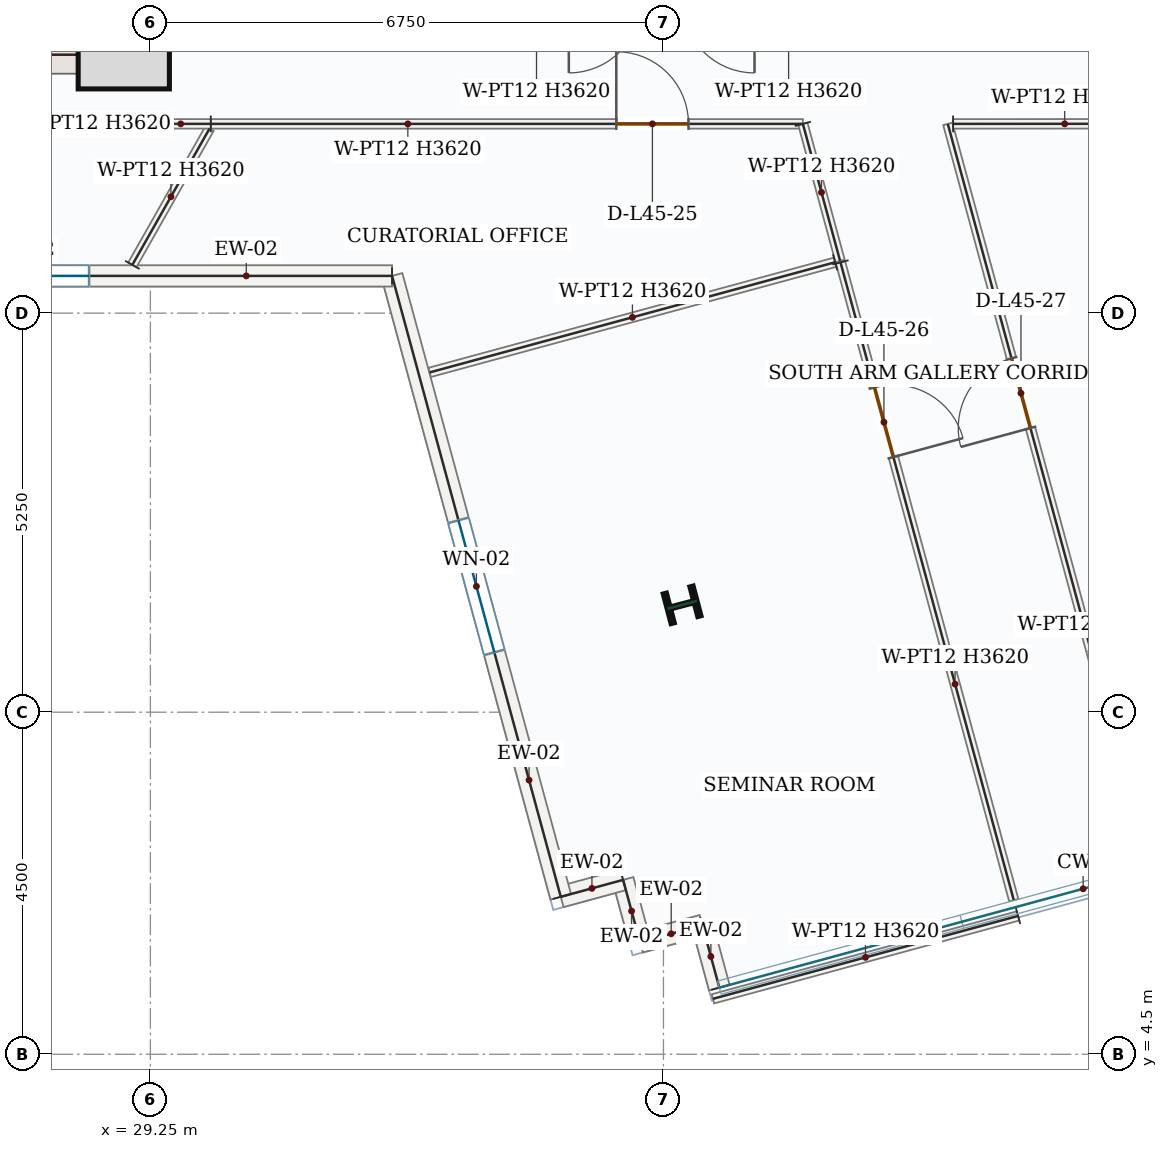
"""IFC4 building model, lengths in metres.
Left out: names, types, materials, properties, quantities, classifications, styles, units other than length and angle.
Written with IfcOpenShell. Run it as: python <this file> out.ifc"""

import sys

from ifc_helpers import new_model, si_unit, direction, frame, frame_2d, origin, origin_2d, place, context, subcontext, project, spatial, rectangle, i_section, extrude, source, transform, mapped, element, fill, save


model = new_model("IFC4")
c1 = context("Model", 3, precision=1e-05, world=origin(), true_north=direction((0.0, 1.0)))
c2 = subcontext(c1, "Body", "Model", "MODEL_VIEW")
j1 = project(units=[si_unit("LENGTHUNIT", "METRE"), si_unit("PLANEANGLEUNIT", "RADIAN")], contexts=[c1])
p1 = place(None, origin())
s1 = spatial("IfcSite", under=j1, at=p1, CompositionType="ELEMENT")
p2 = place(p1, origin())
s2 = spatial("IfcBuilding", under=s1, at=p2, CompositionType="ELEMENT")
p3 = place(p2, frame((0.0, 0.0, 194.1)))
s3 = spatial("IfcBuildingStorey", under=s2, at=p3, CompositionType="ELEMENT", Elevation=194.1)
p4 = place(p3, frame((29.0, 17.4, 0.0), z_axis=(0.0, 0.0, 1.0), x_axis=(0.0, 1.0, 0.0)))
e1 = element("IfcWall", 1, at=p4, inside=s3, PredefinedType="SHEAR", context=c2, shape_type="SweptSolid", body=[
    extrude(rectangle(XDim=8.55, YDim=0.5, at=frame_2d((4.275, 0.0))), origin(), (0.0, 0.0, 1.0), 3.62),
])
p5 = place(p4, frame((6.65, 0.0, 0.0)))
e2 = element("IfcOpeningElement", 2, at=p5, cuts=e1, PredefinedType="OPENING", context=c2, shape_type="SweptSolid", body=[
    extrude(rectangle(XDim=1.1, YDim=2.2, at=frame_2d((0.55, 1.1))), frame((0.0, 0.26, 0.0), z_axis=(0.0, -1.0, 0.0), x_axis=(1.0, 0.0, 0.0)), (0.0, 0.0, 1.0), 0.52),
])
p6 = place(p4, frame((2.15, 0.0, 0.0)))
e3 = element("IfcOpeningElement", 3, at=p6, cuts=e1, PredefinedType="OPENING", context=c2, shape_type="SweptSolid", body=[
    extrude(rectangle(XDim=0.88, YDim=2.1, at=frame_2d((0.44, 1.05))), frame((0.0, 0.26, 0.0), z_axis=(0.0, -1.0, 0.0), x_axis=(1.0, 0.0, 0.0)), (0.0, 0.0, 1.0), 0.52),
])
p7 = place(p4, frame((4.25, 0.0, 0.0)))
e4 = element("IfcOpeningElement", 4, at=p7, cuts=e1, PredefinedType="OPENING", context=c2, shape_type="SweptSolid", body=[
    extrude(rectangle(XDim=0.88, YDim=2.1, at=frame_2d((0.44, 1.05))), frame((0.0, 0.26, 0.0), z_axis=(0.0, -1.0, 0.0), x_axis=(1.0, 0.0, 0.0)), (0.0, 0.0, 1.0), 0.52),
])
m1 = source(origin(), c2, "Body", "SweptSolid", [
    extrude(rectangle(XDim=7.0, YDim=0.5, at=frame_2d((3.5, 0.0))), origin(), (0.0, 0.0, 1.0), 3.62),
])
p8 = place(p3, frame((21.75, 17.65, 0.0), z_axis=(0.0, 0.0, 1.0), x_axis=(1.0, 0.0, 0.0)))
e5 = element("IfcWall", 5, at=p8, inside=s3, PredefinedType="SHEAR", context=c2, shape_type="MappedRepresentation", body=[
    mapped(m1, transform((0.0, 0.0, 0.0), x_axis=(1.0, 0.0, 0.0), y_axis=(0.0, 1.0, 0.0), z_axis=(0.0, 0.0, 1.0), scale=1.0)),
])
m2 = source(origin(), c2, "Body", "SweptSolid", [
    extrude(rectangle(XDim=1.2, YDim=1.2, at=origin_2d()), origin(), (0.0, 0.0, 1.0), 3.9),
])
p9 = place(p3, frame((28.9, 17.8, 0.0), z_axis=(0.0, 0.0, 1.0), x_axis=(1.0, 0.0, 0.0)))
e6 = element("IfcColumn", 6, at=p9, inside=s3, PredefinedType="COLUMN", context=c2, shape_type="MappedRepresentation", body=[
    mapped(m2, transform((0.0, 0.0, 0.0), x_axis=(1.0, 0.0, 0.0), y_axis=(0.0, 1.0, 0.0), z_axis=(0.0, 0.0, 1.0), scale=1.0)),
])
m3 = source(origin(), c2, "Body", "SweptSolid", [
    extrude(i_section(OverallWidth=0.404, OverallDepth=0.407, WebThickness=0.027, FlangeThickness=0.044, FilletRadius=0.018, at=origin_2d()), origin(), (0.0, 0.0, 1.0), 3.9),
])
p10 = place(p3, frame((36.245, 10.412, 0.0), z_axis=(0.0, 0.0, 1.0), x_axis=(-0.255445757936, 0.966823388604, 0.0)))
e7 = element("IfcColumn", 7, at=p10, inside=s3, PredefinedType="COLUMN", context=c2, shape_type="MappedRepresentation", body=[
    mapped(m3, transform((0.0, 0.0, 0.0), x_axis=(1.0, 0.0, 0.0), y_axis=(0.0, 1.0, 0.0), z_axis=(0.0, 0.0, 1.0), scale=1.0)),
])
m4 = source(origin(), c2, "Body", "SweptSolid", [
    extrude(rectangle(XDim=0.85, YDim=0.28, at=frame_2d((0.425, 0.0))), origin(), (0.0, 0.0, 1.0), 3.62),
])
for number, where, z_axis, x_axis in (
    (8, (36.735, 5.376, 0.0), (0.0, 0.0, 1.0), (-0.262, 0.965, 0.0)),
    (9, (36.512, 6.197, 0.0), (0.0, 0.0, 1.0), (-0.965, -0.262, 0.0)),
    (10, (35.692, 5.974, 0.0), (0.0, 0.0, 1.0), (-0.262, 0.965, 0.0)),
    (11, (35.469, 6.794, 0.0), (0.0, 0.0, 1.0), (-0.965, -0.262, 0.0)),
):
    element("IfcWall", number, at=place(p3, frame(where, z_axis=z_axis, x_axis=x_axis)), inside=s3, PredefinedType="SOLIDWALL", context=c2, shape_type="MappedRepresentation", body=[
        mapped(m4, transform((0.0, 0.0, 0.0), x_axis=(1.0, 0.0, 0.0), y_axis=(0.0, 1.0, 0.0), z_axis=(0.0, 0.0, 1.0), scale=1.0)),
    ])
p11 = place(p3, frame((34.649, 6.571, 0.0), z_axis=(0.0, 0.0, 1.0), x_axis=(-0.262192380254, 0.965015624608, 0.0)))
e12 = element("IfcWall", 12, at=p11, inside=s3, PredefinedType="SOLIDWALL", context=c2, shape_type="SweptSolid", body=[
    extrude(rectangle(XDim=8.465, YDim=0.28, at=frame_2d((4.232, 0.0))), origin(), (0.0, 0.0, 1.0), 3.62),
])
p12 = place(p11, frame((3.333, 0.0, 0.85)))
e13 = element("IfcOpeningElement", 13, at=p12, cuts=e12, PredefinedType="OPENING", context=c2, shape_type="SweptSolid", body=[
    extrude(rectangle(XDim=1.8, YDim=1.75, at=frame_2d((0.9, 0.875))), frame((0.0, 0.15, 0.0), z_axis=(0.0, -1.0, 0.0), x_axis=(1.0, 0.0, 0.0)), (0.0, 0.0, 1.0), 0.3),
])
p13 = place(p3, frame((32.429, 14.74, 0.0), z_axis=(0.0, 0.0, 1.0), x_axis=(-1.0, 0.0, 0.0)))
e14 = element("IfcWall", 14, at=p13, inside=s3, PredefinedType="SOLIDWALL", context=c2, shape_type="SweptSolid", body=[
    extrude(rectangle(XDim=9.771, YDim=0.28, at=frame_2d((4.886, 0.0))), origin(), (0.0, 0.0, 1.0), 3.62),
])
p14 = place(p13, frame((3.986, 0.0, 0.85)))
e15 = element("IfcOpeningElement", 15, at=p14, cuts=e14, PredefinedType="OPENING", context=c2, shape_type="SweptSolid", body=[
    extrude(rectangle(XDim=1.8, YDim=1.75, at=frame_2d((0.9, 0.875))), frame((0.0, 0.15, 0.0), z_axis=(0.0, -1.0, 0.0), x_axis=(1.0, 0.0, 0.0)), (0.0, 0.0, 1.0), 0.3),
])
p15 = place(p3, frame((30.045, 16.74, 0.0), z_axis=(0.0, 0.0, 1.0), x_axis=(1.0, 0.0, 0.0)))
e16 = element("IfcWall", 16, at=p15, inside=s3, PredefinedType="PARTITIONING", context=c2, shape_type="SweptSolid", body=[
    extrude(rectangle(XDim=7.79, YDim=0.125, at=frame_2d((3.895, 0.0))), origin(), (0.0, 0.0, 1.0), 3.62),
])
p16 = place(p15, frame((5.335, 0.0, 0.0)))
e17 = element("IfcOpeningElement", 17, at=p16, cuts=e16, PredefinedType="OPENING", context=c2, shape_type="SweptSolid", body=[
    extrude(rectangle(XDim=0.95, YDim=2.15, at=frame_2d((0.475, 1.075))), frame((0.0, 0.073, 0.0), z_axis=(0.0, -1.0, 0.0), x_axis=(1.0, 0.0, 0.0)), (0.0, 0.0, 1.0), 0.145),
])
m5 = source(origin(), c2, "Body", "SweptSolid", [
    extrude(rectangle(XDim=1.868, YDim=0.125, at=frame_2d((0.934, 0.0))), origin(), (0.0, 0.0, 1.0), 3.62),
])
p17 = place(p3, frame((37.834, 16.74, 0.0), z_axis=(0.0, 0.0, 1.0), x_axis=(0.262166249224, -0.965022723964, 0.0)))
e18 = element("IfcWall", 18, at=p17, inside=s3, PredefinedType="PARTITIONING", context=c2, shape_type="MappedRepresentation", body=[
    mapped(m5, transform((0.0, 0.0, 0.0), x_axis=(1.0, 0.0, 0.0), y_axis=(0.0, 1.0, 0.0), z_axis=(0.0, 0.0, 1.0), scale=1.0)),
])
m6 = source(origin(), c2, "Body", "SweptSolid", [
    extrude(rectangle(XDim=5.527, YDim=0.125, at=frame_2d((2.764, 0.0))), origin(), (0.0, 0.0, 1.0), 3.62),
])
p18 = place(p3, frame((38.259, 14.92, 0.0), z_axis=(0.0, 0.0, 1.0), x_axis=(-0.965004985248, -0.262231535949, 0.0)))
e19 = element("IfcWall", 19, at=p18, inside=s3, PredefinedType="PARTITIONING", context=c2, shape_type="MappedRepresentation", body=[
    mapped(m6, transform((0.0, 0.0, 0.0), x_axis=(1.0, 0.0, 0.0), y_axis=(0.0, 1.0, 0.0), z_axis=(0.0, 0.0, 1.0), scale=1.0)),
])
m7 = source(origin(), c2, "Body", "SweptSolid", [
    extrude(rectangle(XDim=2.061, YDim=0.125, at=frame_2d((1.03, 0.0))), origin(), (0.0, 0.0, 1.0), 3.62),
])
p19 = place(p3, frame((29.013, 14.885, 0.0), z_axis=(0.0, 0.0, 1.0), x_axis=(0.492818271576, 0.870132260752, 0.0)))
e20 = element("IfcWall", 20, at=p19, inside=s3, PredefinedType="PARTITIONING", context=c2, shape_type="MappedRepresentation", body=[
    mapped(m7, transform((0.0, 0.0, 0.0), x_axis=(1.0, 0.0, 0.0), y_axis=(0.0, 1.0, 0.0), z_axis=(0.0, 0.0, 1.0), scale=1.0)),
])
p20 = place(p3, frame((38.329, 14.918, 0.0), z_axis=(0.0, 0.0, 1.0), x_axis=(0.262166936223, -0.965022537328, 0.0)))
e21 = element("IfcWall", 21, at=p20, inside=s3, PredefinedType="PARTITIONING", context=c2, shape_type="SweptSolid", body=[
    extrude(rectangle(XDim=8.695, YDim=0.125, at=frame_2d((4.348, 0.0))), origin(), (0.0, 0.0, 1.0), 3.62),
])
p21 = place(p20, frame((1.704, 0.0, 0.0)))
e22 = element("IfcOpeningElement", 22, at=p21, cuts=e21, PredefinedType="OPENING", context=c2, shape_type="SweptSolid", body=[
    extrude(rectangle(XDim=0.95, YDim=2.15, at=frame_2d((0.475, 1.075))), frame((0.0, 0.073, 0.0), z_axis=(0.0, -1.0, 0.0), x_axis=(1.0, 0.0, 0.0)), (0.0, 0.0, 1.0), 0.145),
])
m8 = source(origin(), c2, "Body", "SweptSolid", [
    extrude(rectangle(XDim=4.16, YDim=0.125, at=frame_2d((2.08, 0.0))), origin(), (0.0, 0.0, 1.0), 3.62),
])
p22 = place(p3, frame((40.665, 6.32, 0.0), z_axis=(0.0, 0.0, 1.0), x_axis=(-0.965023387541, -0.262163806614, 0.0)))
e23 = element("IfcWall", 23, at=p22, inside=s3, PredefinedType="PARTITIONING", context=c2, shape_type="MappedRepresentation", body=[
    mapped(m8, transform((0.0, 0.0, 0.0), x_axis=(1.0, 0.0, 0.0), y_axis=(0.0, 1.0, 0.0), z_axis=(0.0, 0.0, 1.0), scale=1.0)),
])
p23 = place(p3, frame((42.385, 7.01, 0.0), z_axis=(0.0, 0.0, 1.0), x_axis=(-0.262203523108, 0.965012597052, 0.0)))
e24 = element("IfcWall", 24, at=p23, inside=s3, PredefinedType="PARTITIONING", context=c2, shape_type="SweptSolid", body=[
    extrude(rectangle(XDim=10.083, YDim=0.125, at=frame_2d((5.042, 0.0))), origin(), (0.0, 0.0, 1.0), 3.62),
])
p24 = place(p23, frame((5.937, 0.0, 0.0)))
e25 = element("IfcOpeningElement", 25, at=p24, cuts=e24, PredefinedType="OPENING", context=c2, shape_type="SweptSolid", body=[
    extrude(rectangle(XDim=0.95, YDim=2.15, at=frame_2d((0.475, 1.075))), frame((0.0, 0.073, 0.0), z_axis=(0.0, -1.0, 0.0), x_axis=(1.0, 0.0, 0.0)), (0.0, 0.0, 1.0), 0.145),
])
m9 = source(origin(), c2, "Body", "SweptSolid", [
    extrude(rectangle(XDim=2.936, YDim=0.125, at=frame_2d((1.468, 0.0))), origin(), (0.0, 0.0, 1.0), 3.149),
])
p25 = place(p3, frame((39.811, 16.74, 0.0), z_axis=(0.0, 0.0, 1.0), x_axis=(0.999999913555, 0.00041580038, 0.0)))
e26 = element("IfcWall", 26, at=p25, inside=s3, PredefinedType="PARTITIONING", context=c2, shape_type="MappedRepresentation", body=[
    mapped(m9, transform((0.0, 0.0, 0.0), x_axis=(1.0, 0.0, 0.0), y_axis=(0.0, 1.0, 0.0), z_axis=(0.0, 0.0, 1.0), scale=1.0)),
])
m10 = source(origin(), c2, "Body", "SweptSolid", [
    extrude(rectangle(XDim=0.791, YDim=0.125, at=frame_2d((0.396, 0.0))), origin(), (0.0, 0.0, 1.0), 3.62),
])
p26 = place(p3, frame((29.253, 16.74, 0.0), z_axis=(0.0, 0.0, 1.0), x_axis=(0.999999809598, -0.000617093372, 0.0)))
e27 = element("IfcWall", 27, at=p26, inside=s3, PredefinedType="PARTITIONING", context=c2, shape_type="MappedRepresentation", body=[
    mapped(m10, transform((0.0, 0.0, 0.0), x_axis=(1.0, 0.0, 0.0), y_axis=(0.0, 1.0, 0.0), z_axis=(0.0, 0.0, 1.0), scale=1.0)),
])
m11 = source(origin(), c2, "Body", "SweptSolid", [
    extrude(rectangle(XDim=1.8, YDim=1.75, at=frame_2d((0.9, 0.875))), frame((0.0, 0.03, 0.0), z_axis=(0.0, -1.0, 0.0), x_axis=(1.0, 0.0, 0.0)), (0.0, 0.0, 1.0), 0.06),
])
p27 = place(p12, origin())
e28 = element("IfcWindow", 28, at=p27, inside=s3, PartitioningType="DOUBLE_PANEL_VERTICAL", PredefinedType="WINDOW", context=c2, shape_type="MappedRepresentation", body=[
    mapped(m11, transform((0.0, 0.0, 0.0), x_axis=(1.0, 0.0, 0.0), y_axis=(0.0, 1.0, 0.0), z_axis=(0.0, 0.0, 1.0), scale=1.0)),
])
fill(e13, e28)
p28 = place(p14, origin())
e29 = element("IfcWindow", 29, at=p28, inside=s3, PartitioningType="DOUBLE_PANEL_VERTICAL", PredefinedType="WINDOW", context=c2, shape_type="MappedRepresentation", body=[
    mapped(m11, transform((0.0, 0.0, 0.0), x_axis=(1.0, 0.0, 0.0), y_axis=(0.0, 1.0, 0.0), z_axis=(0.0, 0.0, 1.0), scale=1.0)),
])
fill(e15, e29)
m12 = source(origin(), c2, "Body", "SweptSolid", [
    extrude(rectangle(XDim=0.95, YDim=2.15, at=frame_2d((0.475, 1.075))), frame((0.0, 0.025, 0.0), z_axis=(0.0, -1.0, 0.0), x_axis=(1.0, 0.0, 0.0)), (0.0, 0.0, 1.0), 0.05),
])
p29 = place(p16, origin())
e30 = element("IfcDoor", 30, at=p29, inside=s3, OperationType="SINGLE_SWING_LEFT", PredefinedType="DOOR", context=c2, shape_type="MappedRepresentation", body=[
    mapped(m12, transform((0.0, 0.0, 0.0), x_axis=(1.0, 0.0, 0.0), y_axis=(0.0, 1.0, 0.0), z_axis=(0.0, 0.0, 1.0), scale=1.0)),
])
fill(e17, e30)
p30 = place(p21, origin())
e31 = element("IfcDoor", 31, at=p30, inside=s3, OperationType="SINGLE_SWING_RIGHT", PredefinedType="DOOR", context=c2, shape_type="MappedRepresentation", body=[
    mapped(m12, transform((0.0, 0.0, 0.0), x_axis=(1.0, 0.0, 0.0), y_axis=(0.0, 1.0, 0.0), z_axis=(0.0, 0.0, 1.0), scale=1.0)),
])
fill(e22, e31)
p31 = place(p24, origin())
e32 = element("IfcDoor", 32, at=p31, inside=s3, OperationType="SINGLE_SWING_LEFT", PredefinedType="DOOR", context=c2, shape_type="MappedRepresentation", body=[
    mapped(m12, transform((0.0, 0.0, 0.0), x_axis=(1.0, 0.0, 0.0), y_axis=(0.0, 1.0, 0.0), z_axis=(0.0, 0.0, 1.0), scale=1.0)),
])
fill(e25, e32)
save(model, sys.argv[1])
